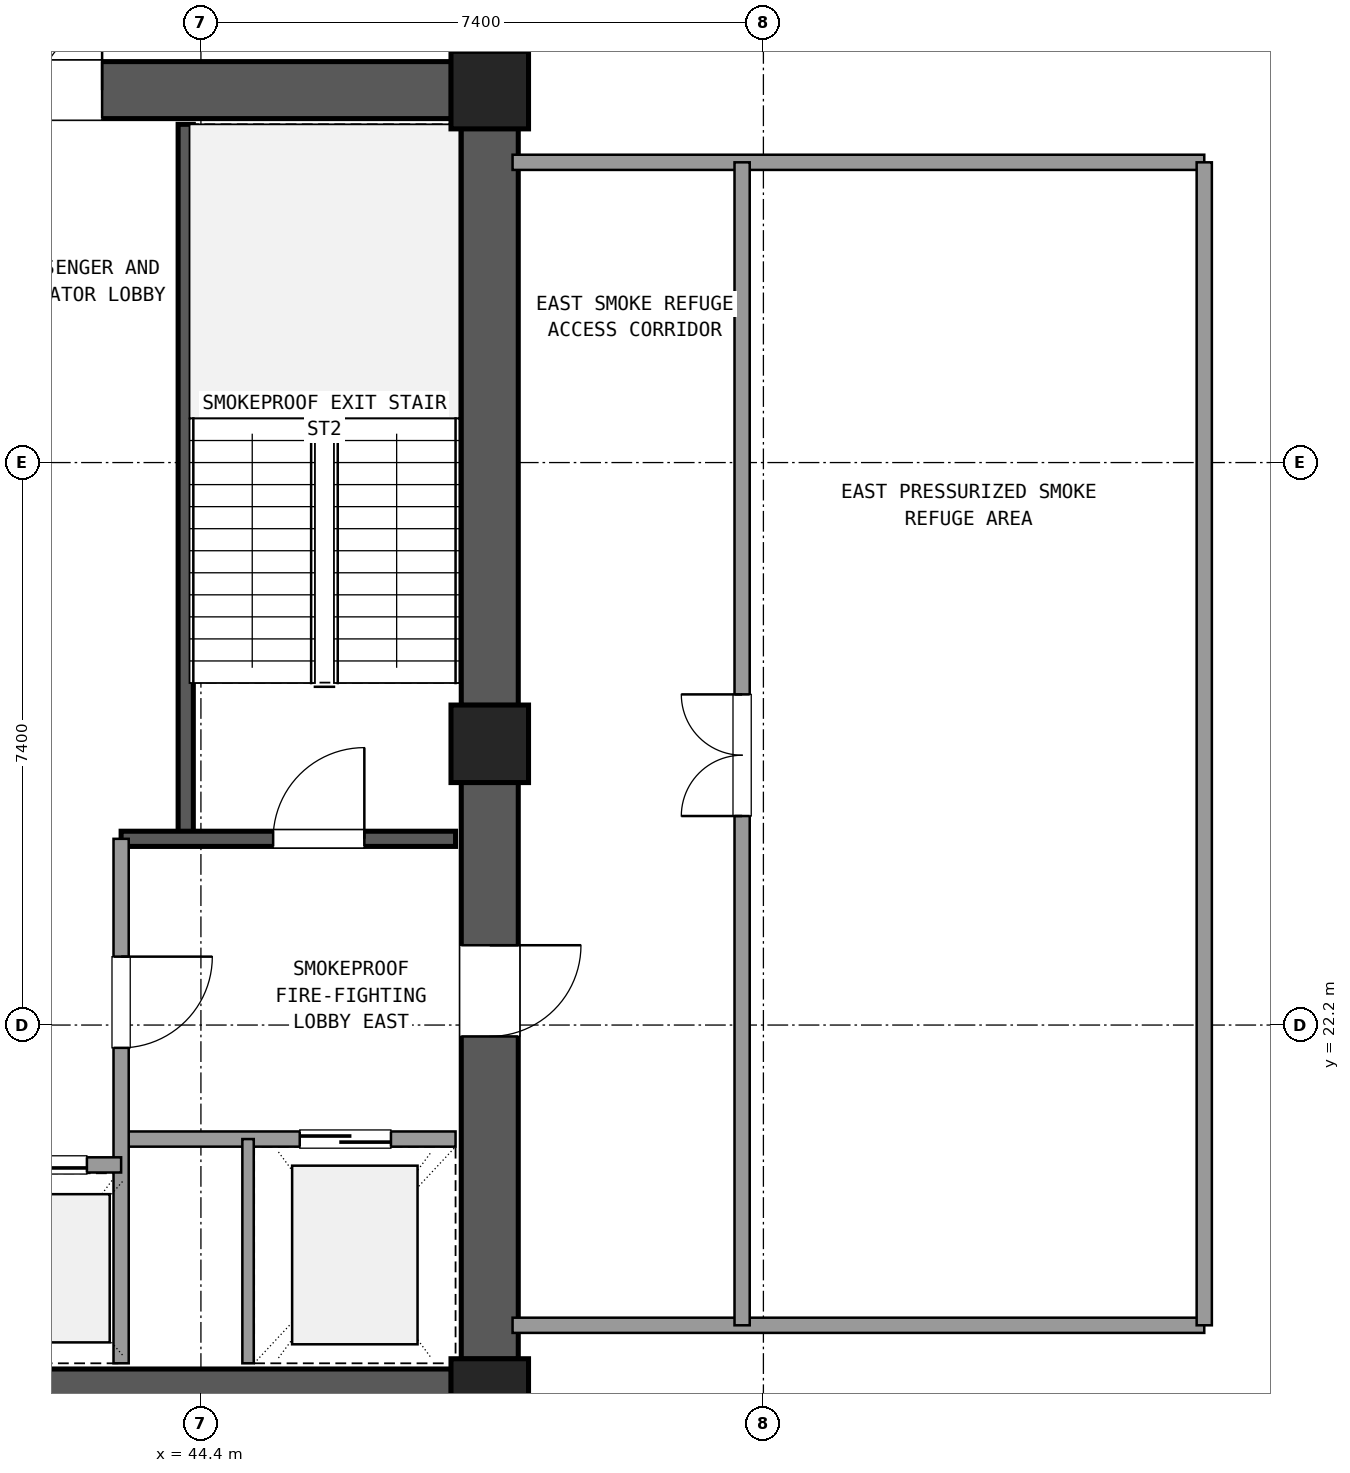
"""IFC4 building model, lengths in metres.
Left out: names, types, materials, properties, quantities, classifications, styles, units other than length and angle.
Written with IfcOpenShell. Run it as: python <this file> out.ifc"""

import sys

from ifc_helpers import new_model, si_unit, direction, frame, frame_2d, origin, origin_2d, place, context, subcontext, project, spatial, rectangle, extrude, element, fill, save


model = new_model("IFC4")
c1 = context("Model", 3, precision=1e-05, world=origin(), true_north=direction((0.0, 1.0)))
c2 = subcontext(c1, "Body", "Model", "MODEL_VIEW")
j1 = project(units=[si_unit("LENGTHUNIT", "METRE"), si_unit("PLANEANGLEUNIT", "RADIAN")], contexts=[c1])
p1 = place(None, origin())
s1 = spatial("IfcSite", under=j1, at=p1, CompositionType="ELEMENT")
p2 = place(p1, origin())
s2 = spatial("IfcBuilding", under=s1, at=p2, CompositionType="ELEMENT")
p3 = place(p2, frame((0.0, 0.0, 124.38)))
s3 = spatial("IfcBuildingStorey", under=s2, at=p3, CompositionType="ELEMENT", Elevation=124.38)
for number, where, z_axis, x_axis in (
    (1, (48.2, 17.3, 0.0), (0.0, 0.0, 1.0), (1.0, 0.0, 0.0)),
    (2, (48.2, 25.9, 0.0), (0.0, 0.0, 1.0), (1.0, 0.0, 0.0)),
    (3, (48.2, 34.5, 0.0), (0.0, 0.0, 1.0), (1.0, 0.0, 0.0)),
):
    element("IfcColumn", number, at=place(p3, frame(where, z_axis=z_axis, x_axis=x_axis)), inside=s3, PredefinedType="COLUMN", context=c2, shape_type="SweptSolid", body=[
        extrude(rectangle(XDim=1.02, YDim=1.02, at=origin_2d()), origin(), (0.0, 0.0, 1.0), 4.68),
    ])
p4 = place(p3, frame((37.505, 17.3, 0.0), z_axis=(0.0, 0.0, 1.0), x_axis=(1.0, 0.0, 0.0)))
e4 = element("IfcWall", 4, at=p4, inside=s3, PredefinedType="SHEAR", context=c2, shape_type="SweptSolid", body=[
    extrude(rectangle(XDim=10.19, YDim=0.75, at=frame_2d((5.095, 0.0))), origin(), (0.0, 0.0, 1.0), 4.38),
])
p5 = place(p3, frame((48.2, 17.805, 0.0), z_axis=(0.0, 0.0, 1.0), x_axis=(0.0, 1.0, 0.0)))
e5 = element("IfcWall", 5, at=p5, inside=s3, PredefinedType="SHEAR", context=c2, shape_type="SweptSolid", body=[
    extrude(rectangle(XDim=7.59, YDim=0.75, at=frame_2d((3.795, 0.0))), origin(), (0.0, 0.0, 1.0), 4.38),
])
p6 = place(p5, frame((4.245, 0.0, 0.0)))
e6 = element("IfcOpeningElement", 6, at=p6, cuts=e5, PredefinedType="OPENING", context=c2, shape_type="SweptSolid", body=[
    extrude(rectangle(XDim=1.2, YDim=2.15, at=frame_2d((0.6, 1.075))), frame((0.0, 0.385, 0.0), z_axis=(0.0, -1.0, 0.0), x_axis=(1.0, 0.0, 0.0)), (0.0, 0.0, 1.0), 0.77),
])
p7 = place(p3, frame((48.2, 26.405, 0.0), z_axis=(0.0, 0.0, 1.0), x_axis=(0.0, 1.0, 0.0)))
e7 = element("IfcWall", 7, at=p7, inside=s3, PredefinedType="SHEAR", context=c2, shape_type="SweptSolid", body=[
    extrude(rectangle(XDim=7.59, YDim=0.75, at=frame_2d((3.795, 0.0))), origin(), (0.0, 0.0, 1.0), 4.38),
])
p8 = place(p3, frame((47.695, 34.5, 0.0), z_axis=(0.0, 0.0, 1.0), x_axis=(-1.0, 0.0, 0.0)))
e8 = element("IfcWall", 8, at=p8, inside=s3, PredefinedType="SHEAR", context=c2, shape_type="SweptSolid", body=[
    extrude(rectangle(XDim=10.19, YDim=0.75, at=frame_2d((5.095, 0.0))), origin(), (0.0, 0.0, 1.0), 4.38),
])
p9 = place(p8, frame((4.595, 0.0, 0.0)))
e9 = element("IfcOpeningElement", 9, at=p9, cuts=e8, PredefinedType="OPENING", context=c2, shape_type="SweptSolid", body=[
    extrude(rectangle(XDim=1.6, YDim=2.2, at=frame_2d((0.8, 1.1))), frame((0.0, 0.385, 0.0), z_axis=(0.0, -1.0, 0.0), x_axis=(1.0, 0.0, 0.0)), (0.0, 0.0, 1.0), 0.77),
])
p10 = place(p3, frame((44.2, 24.65, 0.0), z_axis=(0.0, 0.0, 1.0), x_axis=(0.0, 1.0, 0.0)))
e10 = element("IfcWall", 10, at=p10, inside=s3, PredefinedType="SHEAR", context=c2, shape_type="SweptSolid", body=[
    extrude(rectangle(XDim=9.4, YDim=0.2, at=frame_2d((4.7, 0.0))), origin(), (0.0, 0.0, 1.0), 4.38),
])
p11 = place(p3, frame((43.35, 24.65, 0.0), z_axis=(0.0, 0.0, 1.0), x_axis=(1.0, 0.0, 0.0)))
e11 = element("IfcWall", 11, at=p11, inside=s3, PredefinedType="SHEAR", context=c2, shape_type="SweptSolid", body=[
    extrude(rectangle(XDim=4.4, YDim=0.2, at=frame_2d((2.2, 0.0))), origin(), (0.0, 0.0, 1.0), 4.38),
])
p12 = place(p11, frame((2.0, 0.0, 0.0)))
e12 = element("IfcOpeningElement", 12, at=p12, cuts=e11, PredefinedType="OPENING", context=c2, shape_type="SweptSolid", body=[
    extrude(rectangle(XDim=1.2, YDim=2.15, at=frame_2d((0.6, 1.075))), frame((0.0, 0.11, 0.0), z_axis=(0.0, -1.0, 0.0), x_axis=(1.0, 0.0, 0.0)), (0.0, 0.0, 1.0), 0.22),
])
p13 = place(p3, frame((43.35, 20.7, 0.0), z_axis=(0.0, 0.0, 1.0), x_axis=(1.0, 0.0, 0.0)))
e13 = element("IfcWall", 13, at=p13, inside=s3, PredefinedType="SOLIDWALL", context=c2, shape_type="SweptSolid", body=[
    extrude(rectangle(XDim=4.4, YDim=0.2, at=frame_2d((2.2, 0.0))), origin(), (0.0, 0.0, 1.0), 3.49),
])
p14 = place(p13, frame((2.35, 0.0, 0.0)))
e14 = element("IfcOpeningElement", 14, at=p14, cuts=e13, PredefinedType="OPENING", context=c2, shape_type="SweptSolid", body=[
    extrude(rectangle(XDim=1.2, YDim=2.15, at=frame_2d((0.6, 1.075))), frame((0.0, 0.11, 0.0), z_axis=(0.0, -1.0, 0.0), x_axis=(1.0, 0.0, 0.0)), (0.0, 0.0, 1.0), 0.22),
])
p15 = place(p3, frame((43.35, 17.75, 0.0), z_axis=(0.0, 0.0, 1.0), x_axis=(0.0, 1.0, 0.0)))
e15 = element("IfcWall", 15, at=p15, inside=s3, PredefinedType="SOLIDWALL", context=c2, shape_type="SweptSolid", body=[
    extrude(rectangle(XDim=6.9, YDim=0.2, at=frame_2d((3.45, 0.0))), origin(), (0.0, 0.0, 1.0), 3.49),
])
p16 = place(p15, frame((4.15, 0.0, 0.0)))
e16 = element("IfcOpeningElement", 16, at=p16, cuts=e15, PredefinedType="OPENING", context=c2, shape_type="SweptSolid", body=[
    extrude(rectangle(XDim=1.2, YDim=2.15, at=frame_2d((0.6, 1.075))), frame((0.0, 0.11, 0.0), z_axis=(0.0, -1.0, 0.0), x_axis=(1.0, 0.0, 0.0)), (0.0, 0.0, 1.0), 0.22),
])
p17 = place(p3, frame((45.02, 17.75, 0.0), z_axis=(0.0, 0.0, 1.0), x_axis=(0.0, 1.0, 0.0)))
e17 = element("IfcWall", 17, at=p17, inside=s3, PredefinedType="PARTITIONING", context=c2, shape_type="SweptSolid", body=[
    extrude(rectangle(XDim=2.95, YDim=0.15, at=frame_2d((1.475, 0.0))), origin(), (0.0, 0.0, 1.0), 3.49),
])
p18 = place(p3, frame((37.25, 20.36, 0.0), z_axis=(0.0, 0.0, 1.0), x_axis=(1.0, 0.0, 0.0)))
e18 = element("IfcWall", 18, at=p18, inside=s3, PredefinedType="SOLIDWALL", context=c2, shape_type="SweptSolid", body=[
    extrude(rectangle(XDim=6.1, YDim=0.2, at=frame_2d((3.05, 0.0))), origin(), (0.0, 0.0, 1.0), 3.49),
])
p19 = place(p18, frame((0.45, 0.0, 0.0)))
e19 = element("IfcOpeningElement", 19, at=p19, cuts=e18, PredefinedType="OPENING", context=c2, shape_type="SweptSolid", body=[
    extrude(rectangle(XDim=1.1, YDim=2.15, at=frame_2d((0.55, 1.075))), frame((0.0, 0.11, 0.0), z_axis=(0.0, -1.0, 0.0), x_axis=(1.0, 0.0, 0.0)), (0.0, 0.0, 1.0), 0.22),
])
p20 = place(p18, frame((2.5, 0.0, 0.0)))
e20 = element("IfcOpeningElement", 20, at=p20, cuts=e18, PredefinedType="OPENING", context=c2, shape_type="SweptSolid", body=[
    extrude(rectangle(XDim=1.1, YDim=2.15, at=frame_2d((0.55, 1.075))), frame((0.0, 0.11, 0.0), z_axis=(0.0, -1.0, 0.0), x_axis=(1.0, 0.0, 0.0)), (0.0, 0.0, 1.0), 0.22),
])
p21 = place(p18, frame((4.55, 0.0, 0.0)))
e21 = element("IfcOpeningElement", 21, at=p21, cuts=e18, PredefinedType="OPENING", context=c2, shape_type="SweptSolid", body=[
    extrude(rectangle(XDim=1.1, YDim=2.15, at=frame_2d((0.55, 1.075))), frame((0.0, 0.11, 0.0), z_axis=(0.0, -1.0, 0.0), x_axis=(1.0, 0.0, 0.0)), (0.0, 0.0, 1.0), 0.22),
])
p22 = place(p3, frame((48.0, 34.8, 0.0), z_axis=(0.0, 0.0, 1.0), x_axis=(0.0, 1.0, 0.0)))
e22 = element("IfcWall", 22, at=p22, inside=s3, PredefinedType="SOLIDWALL", context=c2, shape_type="SweptSolid", body=[
    extrude(rectangle(XDim=10.4, YDim=0.2, at=frame_2d((5.2, 0.0))), origin(), (0.0, 0.0, 1.0), 3.49),
])
for number, where, z_axis, x_axis in (
    (23, (48.5, 18.25, 0.0), (0.0, 0.0, 1.0), (1.0, 0.0, 0.0)),
    (24, (48.5, 33.55, 0.0), (0.0, 0.0, 1.0), (1.0, 0.0, 0.0)),
):
    element("IfcWall", number, at=place(p3, frame(where, z_axis=z_axis, x_axis=x_axis)), inside=s3, PredefinedType="SOLIDWALL", context=c2, shape_type="SweptSolid", body=[
        extrude(rectangle(XDim=9.1, YDim=0.2, at=frame_2d((4.55, 0.0))), origin(), (0.0, 0.0, 1.0), 3.49),
    ])
p23 = place(p3, frame((57.6, 18.25, 0.0), z_axis=(0.0, 0.0, 1.0), x_axis=(0.0, 1.0, 0.0)))
e25 = element("IfcWall", 25, at=p23, inside=s3, PredefinedType="SOLIDWALL", context=c2, shape_type="SweptSolid", body=[
    extrude(rectangle(XDim=15.3, YDim=0.2, at=frame_2d((7.65, 0.0))), origin(), (0.0, 0.0, 1.0), 3.49),
])
p24 = place(p3, frame((51.52, 18.25, 0.0), z_axis=(0.0, 0.0, 1.0), x_axis=(0.0, 1.0, 0.0)))
e26 = element("IfcWall", 26, at=p24, inside=s3, PredefinedType="SOLIDWALL", context=c2, shape_type="SweptSolid", body=[
    extrude(rectangle(XDim=15.3, YDim=0.2, at=frame_2d((7.65, 0.0))), origin(), (0.0, 0.0, 1.0), 3.49),
])
p25 = place(p24, frame((6.7, 0.0, 0.0)))
e27 = element("IfcOpeningElement", 27, at=p25, cuts=e26, PredefinedType="OPENING", context=c2, shape_type="SweptSolid", body=[
    extrude(rectangle(XDim=1.6, YDim=2.2, at=frame_2d((0.8, 1.1))), frame((0.0, 0.11, 0.0), z_axis=(0.0, -1.0, 0.0), x_axis=(1.0, 0.0, 0.0)), (0.0, 0.0, 1.0), 0.22),
])
p26 = place(p12, origin())
e28 = element("IfcDoor", 28, at=p26, inside=s3, OperationType="SINGLE_SWING_RIGHT", PredefinedType="DOOR", context=c2, shape_type="SweptSolid", body=[
    extrude(rectangle(XDim=1.2, YDim=2.15, at=frame_2d((0.6, 1.075))), frame((0.0, 0.025, 0.0), z_axis=(0.0, -1.0, 0.0), x_axis=(1.0, 0.0, 0.0)), (0.0, 0.0, 1.0), 0.05),
])
fill(e12, e28)
p27 = place(p14, origin())
e29 = element("IfcDoor", 29, at=p27, inside=s3, OperationType="SLIDING_TO_RIGHT", PredefinedType="DOOR", context=c2, shape_type="SweptSolid", body=[
    extrude(rectangle(XDim=1.2, YDim=2.15, at=frame_2d((0.6, 1.075))), frame((0.0, 0.025, 0.0), z_axis=(0.0, -1.0, 0.0), x_axis=(1.0, 0.0, 0.0)), (0.0, 0.0, 1.0), 0.05),
])
fill(e14, e29)
p28 = place(p16, frame((1.2, 0.0, 0.0), z_axis=(0.0, 0.0, 1.0), x_axis=(-1.0, 0.0, 0.0)))
e30 = element("IfcDoor", 30, at=p28, inside=s3, OperationType="SINGLE_SWING_RIGHT", PredefinedType="DOOR", context=c2, shape_type="SweptSolid", body=[
    extrude(rectangle(XDim=1.2, YDim=2.15, at=frame_2d((0.6, 1.075))), frame((0.0, 0.025, 0.0), z_axis=(0.0, -1.0, 0.0), x_axis=(1.0, 0.0, 0.0)), (0.0, 0.0, 1.0), 0.05),
])
fill(e16, e30)
p29 = place(p6, frame((1.2, 0.0, 0.0), z_axis=(0.0, 0.0, 1.0), x_axis=(-1.0, 0.0, 0.0)))
e31 = element("IfcDoor", 31, at=p29, inside=s3, OperationType="SINGLE_SWING_RIGHT", PredefinedType="DOOR", context=c2, shape_type="SweptSolid", body=[
    extrude(rectangle(XDim=1.2, YDim=2.15, at=frame_2d((0.6, 1.075))), frame((0.0, 0.025, 0.0), z_axis=(0.0, -1.0, 0.0), x_axis=(1.0, 0.0, 0.0)), (0.0, 0.0, 1.0), 0.05),
])
fill(e6, e31)
p30 = place(p9, frame((1.6, 0.0, 0.0), z_axis=(0.0, 0.0, 1.0), x_axis=(-1.0, 0.0, 0.0)))
e32 = element("IfcDoor", 32, at=p30, inside=s3, OperationType="DOUBLE_DOOR_SINGLE_SWING", PredefinedType="DOOR", context=c2, shape_type="SweptSolid", body=[
    extrude(rectangle(XDim=1.6, YDim=2.2, at=frame_2d((0.8, 1.1))), frame((0.0, 0.025, 0.0), z_axis=(0.0, -1.0, 0.0), x_axis=(1.0, 0.0, 0.0)), (0.0, 0.0, 1.0), 0.05),
])
fill(e9, e32)
p31 = place(p21, origin())
e33 = element("IfcDoor", 33, at=p31, inside=s3, OperationType="SLIDING_TO_LEFT", PredefinedType="DOOR", context=c2, shape_type="SweptSolid", body=[
    extrude(rectangle(XDim=1.1, YDim=2.15, at=frame_2d((0.55, 1.075))), frame((0.0, 0.025, 0.0), z_axis=(0.0, -1.0, 0.0), x_axis=(1.0, 0.0, 0.0)), (0.0, 0.0, 1.0), 0.05),
])
fill(e21, e33)
p32 = place(p25, origin())
e34 = element("IfcDoor", 34, at=p32, inside=s3, OperationType="DOUBLE_DOOR_SINGLE_SWING", PredefinedType="DOOR", context=c2, shape_type="SweptSolid", body=[
    extrude(rectangle(XDim=1.6, YDim=2.2, at=frame_2d((0.8, 1.1))), frame((0.0, 0.025, 0.0), z_axis=(0.0, -1.0, 0.0), x_axis=(1.0, 0.0, 0.0)), (0.0, 0.0, 1.0), 0.05),
])
fill(e27, e34)
save(model, sys.argv[1])
